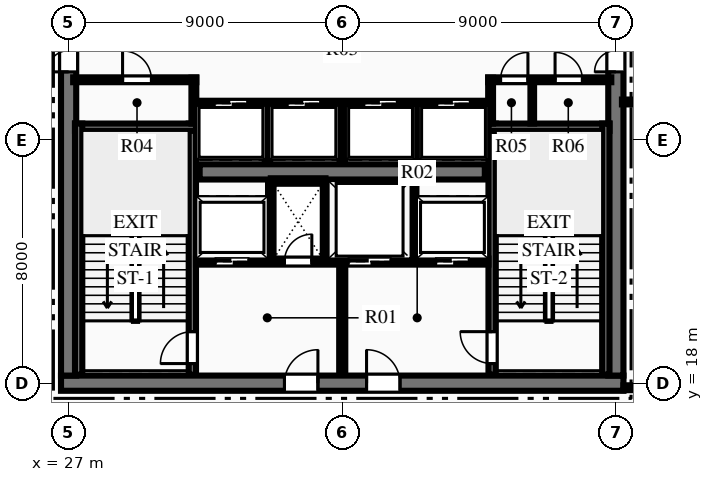
"""IFC4 building model, lengths in metres.
Left out: names, types, materials, properties, quantities, classifications, styles, units other than length and angle.
Written with IfcOpenShell. Run it as: python <this file> out.ifc"""

import sys

from ifc_helpers import new_model, si_unit, direction, frame, frame_2d, origin, place, context, subcontext, project, spatial, rectangle, extrude, element, fill, save


model = new_model("IFC4")
c1 = context("Model", 3, precision=1e-05, world=origin(), true_north=direction((0.0, 1.0)))
c2 = subcontext(c1, "Body", "Model", "MODEL_VIEW")
j1 = project(units=[si_unit("LENGTHUNIT", "METRE"), si_unit("PLANEANGLEUNIT", "RADIAN")], contexts=[c1])
p1 = place(None, origin())
s1 = spatial("IfcSite", under=j1, at=p1, CompositionType="ELEMENT")
p2 = place(p1, origin())
s2 = spatial("IfcBuilding", under=s1, at=p2, CompositionType="ELEMENT")
p3 = place(p2, frame((0.0, 0.0, 174.45)))
s3 = spatial("IfcBuildingStorey", under=s2, at=p3, CompositionType="ELEMENT", Elevation=174.45)
p4 = place(p3, frame((26.75, 18.0, 0.0), z_axis=(0.0, 0.0, 1.0), x_axis=(1.0, 0.0, 0.0)))
e1 = element("IfcWall", 1, at=p4, inside=s3, PredefinedType="SHEAR", context=c2, shape_type="SweptSolid", body=[
    extrude(rectangle(XDim=18.5, YDim=0.5, at=frame_2d((9.25, 0.0))), origin(), (0.0, 0.0, 1.0), 3.75),
])
p5 = place(p4, frame((7.35, 0.0, 0.0)))
e2 = element("IfcOpeningElement", 2, at=p5, cuts=e1, PredefinedType="OPENING", context=c2, shape_type="SweptSolid", body=[
    extrude(rectangle(XDim=1.1, YDim=2.15, at=frame_2d((0.55, 1.075))), frame((0.0, 0.26, 0.0), z_axis=(0.0, -1.0, 0.0), x_axis=(1.0, 0.0, 0.0)), (0.0, 0.0, 1.0), 0.52),
])
p6 = place(p4, frame((10.05, 0.0, 0.0)))
e3 = element("IfcOpeningElement", 3, at=p6, cuts=e1, PredefinedType="OPENING", context=c2, shape_type="SweptSolid", body=[
    extrude(rectangle(XDim=1.1, YDim=2.15, at=frame_2d((0.55, 1.075))), frame((0.0, 0.26, 0.0), z_axis=(0.0, -1.0, 0.0), x_axis=(1.0, 0.0, 0.0)), (0.0, 0.0, 1.0), 0.52),
])
p7 = place(p3, frame((27.0, 18.25, 0.0), z_axis=(0.0, 0.0, 1.0), x_axis=(0.0, 1.0, 0.0)))
e4 = element("IfcWall", 4, at=p7, inside=s3, PredefinedType="SHEAR", context=c2, shape_type="SweptSolid", body=[
    extrude(rectangle(XDim=15.5, YDim=0.5, at=frame_2d((7.75, 0.0))), origin(), (0.0, 0.0, 1.0), 3.75),
])
p8 = place(p7, frame((9.99, 0.0, 0.0)))
e5 = element("IfcOpeningElement", 5, at=p8, cuts=e4, PredefinedType="OPENING", context=c2, shape_type="SweptSolid", body=[
    extrude(rectangle(XDim=1.4, YDim=2.2, at=frame_2d((0.7, 1.1))), frame((0.0, 0.26, 0.0), z_axis=(0.0, -1.0, 0.0), x_axis=(1.0, 0.0, 0.0)), (0.0, 0.0, 1.0), 0.52),
])
p9 = place(p3, frame((45.0, 18.25, 0.0), z_axis=(0.0, 0.0, 1.0), x_axis=(0.0, 1.0, 0.0)))
e6 = element("IfcWall", 6, at=p9, inside=s3, PredefinedType="SHEAR", context=c2, shape_type="SweptSolid", body=[
    extrude(rectangle(XDim=15.5, YDim=0.5, at=frame_2d((7.75, 0.0))), origin(), (0.0, 0.0, 1.0), 3.75),
])
p10 = place(p9, frame((9.99, 0.0, 0.0)))
e7 = element("IfcOpeningElement", 7, at=p10, cuts=e6, PredefinedType="OPENING", context=c2, shape_type="SweptSolid", body=[
    extrude(rectangle(XDim=1.4, YDim=2.2, at=frame_2d((0.7, 1.1))), frame((0.0, 0.26, 0.0), z_axis=(0.0, -1.0, 0.0), x_axis=(1.0, 0.0, 0.0)), (0.0, 0.0, 1.0), 0.52),
])
p11 = place(p3, frame((31.31, 24.95, 0.0), z_axis=(0.0, 0.0, 1.0), x_axis=(1.0, 0.0, 0.0)))
e8 = element("IfcWall", 8, at=p11, inside=s3, PredefinedType="SHEAR", context=c2, shape_type="SweptSolid", body=[
    extrude(rectangle(XDim=9.38, YDim=0.5, at=frame_2d((4.69, 0.0))), origin(), (0.0, 0.0, 1.0), 3.75),
])
p12 = place(p3, frame((31.07, 18.28, 0.0), z_axis=(0.0, 0.0, 1.0), x_axis=(0.0, 1.0, 0.0)))
e9 = element("IfcWall", 9, at=p12, inside=s3, PredefinedType="SHEAR", context=c2, shape_type="SweptSolid", body=[
    extrude(rectangle(XDim=8.26, YDim=0.24, at=frame_2d((4.13, 0.0))), origin(), (0.0, 0.0, 1.0), 3.75),
])
p13 = place(p12, frame((0.365, 0.0, 0.0)))
e10 = element("IfcOpeningElement", 10, at=p13, cuts=e9, PredefinedType="OPENING", context=c2, shape_type="SweptSolid", body=[
    extrude(rectangle(XDim=1.05, YDim=2.15, at=frame_2d((0.525, 1.075))), frame((0.0, 0.13, 0.0), z_axis=(0.0, -1.0, 0.0), x_axis=(1.0, 0.0, 0.0)), (0.0, 0.0, 1.0), 0.26),
])
p14 = place(p3, frame((27.21, 26.42, 0.0), z_axis=(0.0, 0.0, 1.0), x_axis=(1.0, 0.0, 0.0)))
e11 = element("IfcWall", 11, at=p14, inside=s3, PredefinedType="SHEAR", context=c2, shape_type="SweptSolid", body=[
    extrude(rectangle(XDim=3.98, YDim=0.24, at=frame_2d((1.99, 0.0))), origin(), (0.0, 0.0, 1.0), 3.75),
])
p15 = place(p3, frame((27.33, 18.28, 0.0), z_axis=(0.0, 0.0, 1.0), x_axis=(0.0, 1.0, 0.0)))
e12 = element("IfcWall", 12, at=p15, inside=s3, PredefinedType="SHEAR", context=c2, shape_type="SweptSolid", body=[
    extrude(rectangle(XDim=8.26, YDim=0.24, at=frame_2d((4.13, 0.0))), origin(), (0.0, 0.0, 1.0), 3.75),
])
p16 = place(p3, frame((40.93, 18.28, 0.0), z_axis=(0.0, 0.0, 1.0), x_axis=(0.0, 1.0, 0.0)))
e13 = element("IfcWall", 13, at=p16, inside=s3, PredefinedType="SHEAR", context=c2, shape_type="SweptSolid", body=[
    extrude(rectangle(XDim=8.26, YDim=0.24, at=frame_2d((4.13, 0.0))), origin(), (0.0, 0.0, 1.0), 3.75),
])
p17 = place(p16, frame((0.365, 0.0, 0.0)))
e14 = element("IfcOpeningElement", 14, at=p17, cuts=e13, PredefinedType="OPENING", context=c2, shape_type="SweptSolid", body=[
    extrude(rectangle(XDim=1.05, YDim=2.15, at=frame_2d((0.525, 1.075))), frame((0.0, 0.13, 0.0), z_axis=(0.0, -1.0, 0.0), x_axis=(1.0, 0.0, 0.0)), (0.0, 0.0, 1.0), 0.26),
])
p18 = place(p3, frame((40.81, 26.42, 0.0), z_axis=(0.0, 0.0, 1.0), x_axis=(1.0, 0.0, 0.0)))
e15 = element("IfcWall", 15, at=p18, inside=s3, PredefinedType="SHEAR", context=c2, shape_type="SweptSolid", body=[
    extrude(rectangle(XDim=3.98, YDim=0.24, at=frame_2d((1.99, 0.0))), origin(), (0.0, 0.0, 1.0), 3.75),
])
p19 = place(p3, frame((44.67, 18.28, 0.0), z_axis=(0.0, 0.0, 1.0), x_axis=(0.0, 1.0, 0.0)))
e16 = element("IfcWall", 16, at=p19, inside=s3, PredefinedType="SHEAR", context=c2, shape_type="SweptSolid", body=[
    extrude(rectangle(XDim=8.26, YDim=0.24, at=frame_2d((4.13, 0.0))), origin(), (0.0, 0.0, 1.0), 3.75),
])
p20 = place(p3, frame((36.0, 18.28, 0.0), z_axis=(0.0, 0.0, 1.0), x_axis=(0.0, 1.0, 0.0)))
e17 = element("IfcWall", 17, at=p20, inside=s3, PredefinedType="PARTITIONING", context=c2, shape_type="SweptSolid", body=[
    extrude(rectangle(XDim=3.77, YDim=0.2, at=frame_2d((1.885, 0.0))), origin(), (0.0, 0.0, 1.0), 3.46),
])
p21 = place(p3, frame((31.19, 22.0, 0.0), z_axis=(0.0, 0.0, 1.0), x_axis=(1.0, 0.0, 0.0)))
e18 = element("IfcWall", 18, at=p21, inside=s3, PredefinedType="PARTITIONING", context=c2, shape_type="SweptSolid", body=[
    extrude(rectangle(XDim=4.69, YDim=0.2, at=frame_2d((2.345, 0.0))), origin(), (0.0, 0.0, 1.0), 3.46),
])
p22 = place(p21, frame((2.91, 0.0, 0.0)))
e19 = element("IfcOpeningElement", 19, at=p22, cuts=e18, PredefinedType="OPENING", context=c2, shape_type="SweptSolid", body=[
    extrude(rectangle(XDim=0.9, YDim=2.15, at=frame_2d((0.45, 1.075))), frame((0.0, 0.11, 0.0), z_axis=(0.0, -1.0, 0.0), x_axis=(1.0, 0.0, 0.0)), (0.0, 0.0, 1.0), 0.22),
])
p23 = place(p21, frame((0.635, 0.0, 0.0)))
e20 = element("IfcOpeningElement", 20, at=p23, cuts=e18, PredefinedType="OPENING", context=c2, shape_type="SweptSolid", body=[
    extrude(rectangle(XDim=1.1, YDim=2.15, at=frame_2d((0.55, 1.075))), frame((0.0, 0.11, 0.0), z_axis=(0.0, -1.0, 0.0), x_axis=(1.0, 0.0, 0.0)), (0.0, 0.0, 1.0), 0.22),
])
p24 = place(p3, frame((36.12, 22.0, 0.0), z_axis=(0.0, 0.0, 1.0), x_axis=(1.0, 0.0, 0.0)))
e21 = element("IfcWall", 21, at=p24, inside=s3, PredefinedType="PARTITIONING", context=c2, shape_type="SweptSolid", body=[
    extrude(rectangle(XDim=4.69, YDim=0.2, at=frame_2d((2.345, 0.0))), origin(), (0.0, 0.0, 1.0), 3.46),
])
p25 = place(p24, frame((2.955, 0.0, 0.0)))
e22 = element("IfcOpeningElement", 22, at=p25, cuts=e21, PredefinedType="OPENING", context=c2, shape_type="SweptSolid", body=[
    extrude(rectangle(XDim=1.1, YDim=2.15, at=frame_2d((0.55, 1.075))), frame((0.0, 0.11, 0.0), z_axis=(0.0, -1.0, 0.0), x_axis=(1.0, 0.0, 0.0)), (0.0, 0.0, 1.0), 0.22),
])
p26 = place(p24, frame((0.08, 0.0, 0.0)))
e23 = element("IfcOpeningElement", 23, at=p26, cuts=e21, PredefinedType="OPENING", context=c2, shape_type="SweptSolid", body=[
    extrude(rectangle(XDim=1.4, YDim=2.2, at=frame_2d((0.7, 1.1))), frame((0.0, 0.11, 0.0), z_axis=(0.0, -1.0, 0.0), x_axis=(1.0, 0.0, 0.0)), (0.0, 0.0, 1.0), 0.22),
])
for number, where, z_axis, x_axis in (
    (24, (33.65, 22.05, 0.0), (0.0, 0.0, 1.0), (0.0, 1.0, 0.0)),
    (25, (35.45, 22.05, 0.0), (0.0, 0.0, 1.0), (0.0, 1.0, 0.0)),
):
    element("IfcWall", number, at=place(p3, frame(where, z_axis=z_axis, x_axis=x_axis)), inside=s3, PredefinedType="PARTITIONING", context=c2, shape_type="SweptSolid", body=[
        extrude(rectangle(XDim=2.6, YDim=0.18, at=frame_2d((1.3, 0.0))), origin(), (0.0, 0.0, 1.0), 3.46),
    ])
p27 = place(p3, frame((33.65, 24.65, 0.0), z_axis=(0.0, 0.0, 1.0), x_axis=(1.0, 0.0, 0.0)))
e26 = element("IfcWall", 26, at=p27, inside=s3, PredefinedType="PARTITIONING", context=c2, shape_type="SweptSolid", body=[
    extrude(rectangle(XDim=1.8, YDim=0.18, at=frame_2d((0.9, 0.0))), origin(), (0.0, 0.0, 1.0), 3.46),
])
p28 = place(p3, frame((38.35, 22.05, 0.0), z_axis=(0.0, 0.0, 1.0), x_axis=(0.0, 1.0, 0.0)))
e27 = element("IfcWall", 27, at=p28, inside=s3, PredefinedType="PARTITIONING", context=c2, shape_type="SweptSolid", body=[
    extrude(rectangle(XDim=2.6, YDim=0.18, at=frame_2d((1.3, 0.0))), origin(), (0.0, 0.0, 1.0), 3.46),
])
p29 = place(p3, frame((27.15, 27.98, 0.0), z_axis=(0.0, 0.0, 1.0), x_axis=(1.0, 0.0, 0.0)))
e28 = element("IfcWall", 28, at=p29, inside=s3, PredefinedType="PARTITIONING", context=c2, shape_type="SweptSolid", body=[
    extrude(rectangle(XDim=4.05, YDim=0.16, at=frame_2d((2.025, 0.0))), origin(), (0.0, 0.0, 1.0), 3.46),
])
p30 = place(p29, frame((1.625, 0.0, 0.0)))
e29 = element("IfcOpeningElement", 29, at=p30, cuts=e28, PredefinedType="OPENING", context=c2, shape_type="SweptSolid", body=[
    extrude(rectangle(XDim=0.95, YDim=2.15, at=frame_2d((0.475, 1.075))), frame((0.0, 0.09, 0.0), z_axis=(0.0, -1.0, 0.0), x_axis=(1.0, 0.0, 0.0)), (0.0, 0.0, 1.0), 0.18),
])
p31 = place(p3, frame((31.12, 26.54, 0.0), z_axis=(0.0, 0.0, 1.0), x_axis=(0.0, 1.0, 0.0)))
e30 = element("IfcWall", 30, at=p31, inside=s3, PredefinedType="PARTITIONING", context=c2, shape_type="SweptSolid", body=[
    extrude(rectangle(XDim=1.51, YDim=0.16, at=frame_2d((0.755, 0.0))), origin(), (0.0, 0.0, 1.0), 3.46),
])
p32 = place(p3, frame((40.8, 27.98, 0.0), z_axis=(0.0, 0.0, 1.0), x_axis=(1.0, 0.0, 0.0)))
e31 = element("IfcWall", 31, at=p32, inside=s3, PredefinedType="PARTITIONING", context=c2, shape_type="SweptSolid", body=[
    extrude(rectangle(XDim=4.05, YDim=0.16, at=frame_2d((2.025, 0.0))), origin(), (0.0, 0.0, 1.0), 3.46),
])
p33 = place(p32, frame((0.407, 0.0, 0.0)))
e32 = element("IfcOpeningElement", 32, at=p33, cuts=e31, PredefinedType="OPENING", context=c2, shape_type="SweptSolid", body=[
    extrude(rectangle(XDim=0.9, YDim=2.15, at=frame_2d((0.45, 1.075))), frame((0.0, 0.09, 0.0), z_axis=(0.0, -1.0, 0.0), x_axis=(1.0, 0.0, 0.0)), (0.0, 0.0, 1.0), 0.18),
])
p34 = place(p32, frame((2.2, 0.0, 0.0)))
e33 = element("IfcOpeningElement", 33, at=p34, cuts=e31, PredefinedType="OPENING", context=c2, shape_type="SweptSolid", body=[
    extrude(rectangle(XDim=0.9, YDim=2.15, at=frame_2d((0.45, 1.075))), frame((0.0, 0.09, 0.0), z_axis=(0.0, -1.0, 0.0), x_axis=(1.0, 0.0, 0.0)), (0.0, 0.0, 1.0), 0.18),
])
p35 = place(p3, frame((40.88, 26.54, 0.0), z_axis=(0.0, 0.0, 1.0), x_axis=(0.0, 1.0, 0.0)))
e34 = element("IfcWall", 34, at=p35, inside=s3, PredefinedType="PARTITIONING", context=c2, shape_type="SweptSolid", body=[
    extrude(rectangle(XDim=1.51, YDim=0.16, at=frame_2d((0.755, 0.0))), origin(), (0.0, 0.0, 1.0), 3.46),
])
p36 = place(p3, frame((42.25, 26.54, 0.0), z_axis=(0.0, 0.0, 1.0), x_axis=(0.0, 1.0, 0.0)))
e35 = element("IfcWall", 35, at=p36, inside=s3, PredefinedType="PARTITIONING", context=c2, shape_type="SweptSolid", body=[
    extrude(rectangle(XDim=1.44, YDim=0.12, at=frame_2d((0.72, 0.0))), origin(), (0.0, 0.0, 1.0), 3.46),
])
p37 = place(p3, frame((31.2, 27.2, 0.0), z_axis=(0.0, 0.0, 1.0), x_axis=(1.0, 0.0, 0.0)))
e36 = element("IfcWall", 36, at=p37, inside=s3, PredefinedType="PARTITIONING", context=c2, shape_type="SweptSolid", body=[
    extrude(rectangle(XDim=9.6, YDim=0.18, at=frame_2d((4.8, 0.0))), origin(), (0.0, 0.0, 1.0), 3.46),
])
p38 = place(p37, frame((0.59, 0.0, 0.0)))
e37 = element("IfcOpeningElement", 37, at=p38, cuts=e36, PredefinedType="OPENING", context=c2, shape_type="SweptSolid", body=[
    extrude(rectangle(XDim=1.1, YDim=2.15, at=frame_2d((0.55, 1.075))), frame((0.0, 0.1, 0.0), z_axis=(0.0, -1.0, 0.0), x_axis=(1.0, 0.0, 0.0)), (0.0, 0.0, 1.0), 0.2),
])
p39 = place(p37, frame((2.99, 0.0, 0.0)))
e38 = element("IfcOpeningElement", 38, at=p39, cuts=e36, PredefinedType="OPENING", context=c2, shape_type="SweptSolid", body=[
    extrude(rectangle(XDim=1.1, YDim=2.15, at=frame_2d((0.55, 1.075))), frame((0.0, 0.1, 0.0), z_axis=(0.0, -1.0, 0.0), x_axis=(1.0, 0.0, 0.0)), (0.0, 0.0, 1.0), 0.2),
])
p40 = place(p37, frame((5.51, 0.0, 0.0)))
e39 = element("IfcOpeningElement", 39, at=p40, cuts=e36, PredefinedType="OPENING", context=c2, shape_type="SweptSolid", body=[
    extrude(rectangle(XDim=1.1, YDim=2.15, at=frame_2d((0.55, 1.075))), frame((0.0, 0.1, 0.0), z_axis=(0.0, -1.0, 0.0), x_axis=(1.0, 0.0, 0.0)), (0.0, 0.0, 1.0), 0.2),
])
p41 = place(p37, frame((7.91, 0.0, 0.0)))
e40 = element("IfcOpeningElement", 40, at=p41, cuts=e36, PredefinedType="OPENING", context=c2, shape_type="SweptSolid", body=[
    extrude(rectangle(XDim=1.1, YDim=2.15, at=frame_2d((0.55, 1.075))), frame((0.0, 0.1, 0.0), z_axis=(0.0, -1.0, 0.0), x_axis=(1.0, 0.0, 0.0)), (0.0, 0.0, 1.0), 0.2),
])
for number, where, z_axis, x_axis in (
    (41, (33.54, 25.3, 0.0), (0.0, 0.0, 1.0), (0.0, 1.0, 0.0)),
    (42, (36.0, 25.3, 0.0), (0.0, 0.0, 1.0), (0.0, 1.0, 0.0)),
    (43, (38.46, 25.3, 0.0), (0.0, 0.0, 1.0), (0.0, 1.0, 0.0)),
):
    element("IfcWall", number, at=place(p3, frame(where, z_axis=z_axis, x_axis=x_axis)), inside=s3, PredefinedType="PARTITIONING", context=c2, shape_type="SweptSolid", body=[
        extrude(rectangle(XDim=1.9, YDim=0.18, at=frame_2d((0.95, 0.0))), origin(), (0.0, 0.0, 1.0), 3.46),
    ])
p42 = place(p3, frame((45.25, 17.85, 0.0), z_axis=(0.0, 0.0, 1.0), x_axis=(1.0, 0.0, 0.0)))
e44 = element("IfcWall", 44, at=p42, inside=s3, PredefinedType="PARTITIONING", context=c2, shape_type="SweptSolid", body=[
    extrude(rectangle(XDim=8.55, YDim=0.16, at=frame_2d((4.275, 0.0))), origin(), (0.0, 0.0, 1.0), 2.839),
])
p43 = place(p42, frame((2.211, 0.0, 0.0)))
e45 = element("IfcOpeningElement", 45, at=p43, cuts=e44, PredefinedType="OPENING", context=c2, shape_type="SweptSolid", body=[
    extrude(rectangle(XDim=1.05, YDim=2.15, at=frame_2d((0.525, 1.075))), frame((0.0, 0.09, 0.0), z_axis=(0.0, -1.0, 0.0), x_axis=(1.0, 0.0, 0.0)), (0.0, 0.0, 1.0), 0.18),
])
p44 = place(p3, frame((45.2, 27.25, 0.0), z_axis=(0.0, 0.0, 1.0), x_axis=(1.0, 0.0, 0.0)))
e46 = element("IfcWall", 46, at=p44, inside=s3, PredefinedType="PARTITIONING", context=c2, shape_type="SweptSolid", body=[
    extrude(rectangle(XDim=2.25, YDim=0.16, at=frame_2d((1.125, 0.0))), origin(), (0.0, 0.0, 1.0), 3.46),
])
p45 = place(p30, origin())
e47 = element("IfcDoor", 47, at=p45, inside=s3, OperationType="SINGLE_SWING_LEFT", PredefinedType="DOOR", context=c2, shape_type="SweptSolid", body=[
    extrude(rectangle(XDim=0.95, YDim=2.15, at=frame_2d((0.475, 1.075))), frame((0.0, 0.025, 0.0), z_axis=(0.0, -1.0, 0.0), x_axis=(1.0, 0.0, 0.0)), (0.0, 0.0, 1.0), 0.05),
])
fill(e29, e47)
p46 = place(p33, origin())
e48 = element("IfcDoor", 48, at=p46, inside=s3, OperationType="SINGLE_SWING_RIGHT", PredefinedType="DOOR", context=c2, shape_type="SweptSolid", body=[
    extrude(rectangle(XDim=0.9, YDim=2.15, at=frame_2d((0.45, 1.075))), frame((0.0, 0.025, 0.0), z_axis=(0.0, -1.0, 0.0), x_axis=(1.0, 0.0, 0.0)), (0.0, 0.0, 1.0), 0.05),
])
fill(e32, e48)
p47 = place(p34, origin())
e49 = element("IfcDoor", 49, at=p47, inside=s3, OperationType="SINGLE_SWING_LEFT", PredefinedType="DOOR", context=c2, shape_type="SweptSolid", body=[
    extrude(rectangle(XDim=0.9, YDim=2.15, at=frame_2d((0.45, 1.075))), frame((0.0, 0.025, 0.0), z_axis=(0.0, -1.0, 0.0), x_axis=(1.0, 0.0, 0.0)), (0.0, 0.0, 1.0), 0.05),
])
fill(e33, e49)
p48 = place(p13, origin())
e50 = element("IfcDoor", 50, at=p48, inside=s3, OperationType="SINGLE_SWING_LEFT", PredefinedType="DOOR", context=c2, shape_type="SweptSolid", body=[
    extrude(rectangle(XDim=1.05, YDim=2.15, at=frame_2d((0.525, 1.075))), frame((0.0, 0.025, 0.0), z_axis=(0.0, -1.0, 0.0), x_axis=(1.0, 0.0, 0.0)), (0.0, 0.0, 1.0), 0.05),
])
fill(e10, e50)
p49 = place(p17, origin())
e51 = element("IfcDoor", 51, at=p49, inside=s3, OperationType="SINGLE_SWING_RIGHT", PredefinedType="DOOR", context=c2, shape_type="SweptSolid", body=[
    extrude(rectangle(XDim=1.05, YDim=2.15, at=frame_2d((0.525, 1.075))), frame((0.0, 0.025, 0.0), z_axis=(0.0, -1.0, 0.0), x_axis=(1.0, 0.0, 0.0)), (0.0, 0.0, 1.0), 0.05),
])
fill(e14, e51)
p50 = place(p5, origin())
e52 = element("IfcDoor", 52, at=p50, inside=s3, OperationType="SINGLE_SWING_RIGHT", PredefinedType="DOOR", context=c2, shape_type="SweptSolid", body=[
    extrude(rectangle(XDim=1.1, YDim=2.15, at=frame_2d((0.55, 1.075))), frame((0.0, 0.025, 0.0), z_axis=(0.0, -1.0, 0.0), x_axis=(1.0, 0.0, 0.0)), (0.0, 0.0, 1.0), 0.05),
])
fill(e2, e52)
p51 = place(p6, origin())
e53 = element("IfcDoor", 53, at=p51, inside=s3, OperationType="SINGLE_SWING_LEFT", PredefinedType="DOOR", context=c2, shape_type="SweptSolid", body=[
    extrude(rectangle(XDim=1.1, YDim=2.15, at=frame_2d((0.55, 1.075))), frame((0.0, 0.025, 0.0), z_axis=(0.0, -1.0, 0.0), x_axis=(1.0, 0.0, 0.0)), (0.0, 0.0, 1.0), 0.05),
])
fill(e3, e53)
p52 = place(p22, origin())
e54 = element("IfcDoor", 54, at=p52, inside=s3, OperationType="SINGLE_SWING_RIGHT", PredefinedType="DOOR", context=c2, shape_type="SweptSolid", body=[
    extrude(rectangle(XDim=0.9, YDim=2.15, at=frame_2d((0.45, 1.075))), frame((0.0, 0.025, 0.0), z_axis=(0.0, -1.0, 0.0), x_axis=(1.0, 0.0, 0.0)), (0.0, 0.0, 1.0), 0.05),
])
fill(e19, e54)
p53 = place(p8, origin())
e55 = element("IfcDoor", 55, at=p53, inside=s3, OperationType="DOUBLE_DOOR_SINGLE_SWING", PredefinedType="DOOR", context=c2, shape_type="SweptSolid", body=[
    extrude(rectangle(XDim=1.4, YDim=2.2, at=frame_2d((0.7, 1.1))), frame((0.0, 0.025, 0.0), z_axis=(0.0, -1.0, 0.0), x_axis=(1.0, 0.0, 0.0)), (0.0, 0.0, 1.0), 0.05),
])
fill(e5, e55)
p54 = place(p10, origin())
e56 = element("IfcDoor", 56, at=p54, inside=s3, OperationType="DOUBLE_DOOR_SINGLE_SWING", PredefinedType="DOOR", context=c2, shape_type="SweptSolid", body=[
    extrude(rectangle(XDim=1.4, YDim=2.2, at=frame_2d((0.7, 1.1))), frame((0.0, 0.025, 0.0), z_axis=(0.0, -1.0, 0.0), x_axis=(1.0, 0.0, 0.0)), (0.0, 0.0, 1.0), 0.05),
])
fill(e7, e56)
p55 = place(p38, origin())
e57 = element("IfcDoor", 57, at=p55, inside=s3, OperationType="SLIDING_TO_LEFT", PredefinedType="DOOR", context=c2, shape_type="SweptSolid", body=[
    extrude(rectangle(XDim=1.1, YDim=2.15, at=frame_2d((0.55, 1.075))), frame((0.0, 0.025, 0.0), z_axis=(0.0, -1.0, 0.0), x_axis=(1.0, 0.0, 0.0)), (0.0, 0.0, 1.0), 0.05),
])
fill(e37, e57)
p56 = place(p39, origin())
e58 = element("IfcDoor", 58, at=p56, inside=s3, OperationType="SLIDING_TO_LEFT", PredefinedType="DOOR", context=c2, shape_type="SweptSolid", body=[
    extrude(rectangle(XDim=1.1, YDim=2.15, at=frame_2d((0.55, 1.075))), frame((0.0, 0.025, 0.0), z_axis=(0.0, -1.0, 0.0), x_axis=(1.0, 0.0, 0.0)), (0.0, 0.0, 1.0), 0.05),
])
fill(e38, e58)
p57 = place(p40, origin())
e59 = element("IfcDoor", 59, at=p57, inside=s3, OperationType="SLIDING_TO_LEFT", PredefinedType="DOOR", context=c2, shape_type="SweptSolid", body=[
    extrude(rectangle(XDim=1.1, YDim=2.15, at=frame_2d((0.55, 1.075))), frame((0.0, 0.025, 0.0), z_axis=(0.0, -1.0, 0.0), x_axis=(1.0, 0.0, 0.0)), (0.0, 0.0, 1.0), 0.05),
])
fill(e39, e59)
p58 = place(p41, origin())
e60 = element("IfcDoor", 60, at=p58, inside=s3, OperationType="SLIDING_TO_LEFT", PredefinedType="DOOR", context=c2, shape_type="SweptSolid", body=[
    extrude(rectangle(XDim=1.1, YDim=2.15, at=frame_2d((0.55, 1.075))), frame((0.0, 0.025, 0.0), z_axis=(0.0, -1.0, 0.0), x_axis=(1.0, 0.0, 0.0)), (0.0, 0.0, 1.0), 0.05),
])
fill(e40, e60)
p59 = place(p23, origin())
e61 = element("IfcDoor", 61, at=p59, inside=s3, OperationType="SLIDING_TO_LEFT", PredefinedType="DOOR", context=c2, shape_type="SweptSolid", body=[
    extrude(rectangle(XDim=1.1, YDim=2.15, at=frame_2d((0.55, 1.075))), frame((0.0, 0.025, 0.0), z_axis=(0.0, -1.0, 0.0), x_axis=(1.0, 0.0, 0.0)), (0.0, 0.0, 1.0), 0.05),
])
fill(e20, e61)
p60 = place(p25, origin())
e62 = element("IfcDoor", 62, at=p60, inside=s3, OperationType="SLIDING_TO_LEFT", PredefinedType="DOOR", context=c2, shape_type="SweptSolid", body=[
    extrude(rectangle(XDim=1.1, YDim=2.15, at=frame_2d((0.55, 1.075))), frame((0.0, 0.025, 0.0), z_axis=(0.0, -1.0, 0.0), x_axis=(1.0, 0.0, 0.0)), (0.0, 0.0, 1.0), 0.05),
])
fill(e22, e62)
p61 = place(p26, origin())
e63 = element("IfcDoor", 63, at=p61, inside=s3, OperationType="SLIDING_TO_LEFT", PredefinedType="DOOR", context=c2, shape_type="SweptSolid", body=[
    extrude(rectangle(XDim=1.4, YDim=2.2, at=frame_2d((0.7, 1.1))), frame((0.0, 0.025, 0.0), z_axis=(0.0, -1.0, 0.0), x_axis=(1.0, 0.0, 0.0)), (0.0, 0.0, 1.0), 0.05),
])
fill(e23, e63)
save(model, sys.argv[1])
